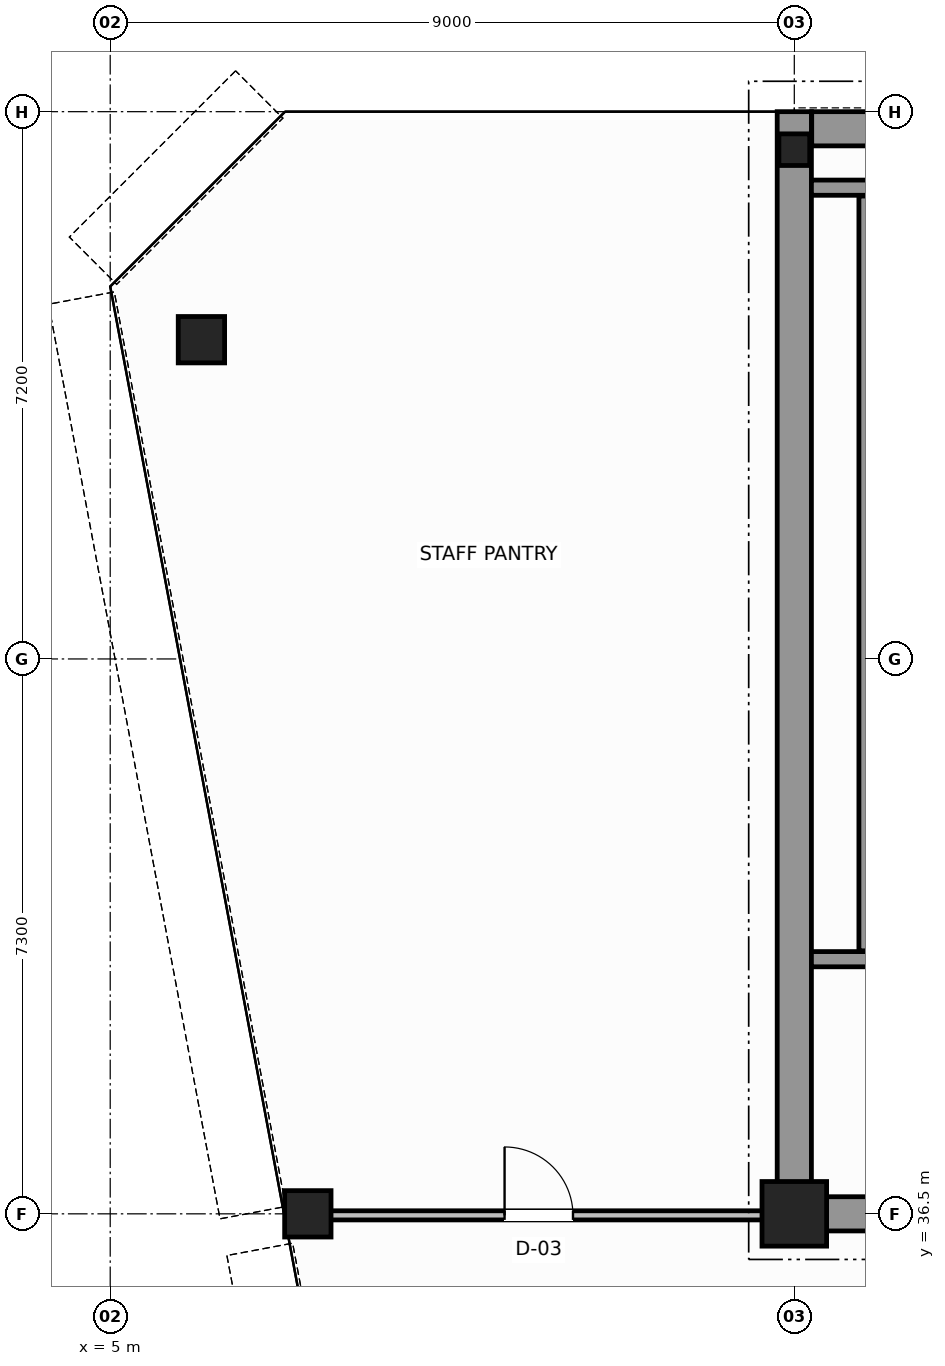
"""IFC4 building model, lengths in metres.
Left out: names, types, materials, properties, quantities, classifications, styles, units other than length and angle.
Written with IfcOpenShell. Run it as: python <this file> out.ifc"""

import sys

from ifc_helpers import new_model, si_unit, direction, frame, frame_2d, origin, origin_2d, place, context, subcontext, project, spatial, rectangle, hollow_circle, i_section, extrude, source, transform, mapped, element, fill, save


model = new_model("IFC4")
c1 = context("Model", 3, precision=1e-05, world=origin(), true_north=direction((0.0, 1.0)))
c2 = subcontext(c1, "Body", "Model", "MODEL_VIEW")
j1 = project(units=[si_unit("LENGTHUNIT", "METRE"), si_unit("PLANEANGLEUNIT", "RADIAN")], contexts=[c1])
p1 = place(None, origin())
s1 = spatial("IfcSite", under=j1, at=p1, CompositionType="ELEMENT")
p2 = place(p1, origin())
s2 = spatial("IfcBuilding", under=s1, at=p2, CompositionType="ELEMENT")
p3 = place(p2, frame((0.0, 0.0, 299.2)))
s3 = spatial("IfcBuildingStorey", under=s2, at=p3, CompositionType="ELEMENT", Elevation=299.2)
m1 = source(origin(), c2, "Body", "SweptSolid", [
    extrude(rectangle(XDim=0.85, YDim=0.85, at=origin_2d()), origin(), (0.0, 0.0, 1.0), 4.6),
])
p4 = place(p3, frame((14.0, 36.5, 0.0), z_axis=(0.0, 0.0, 1.0), x_axis=(1.0, 0.0, 0.0)))
e1 = element("IfcColumn", 1, at=p4, inside=s3, PredefinedType="COLUMN", context=c2, shape_type="MappedRepresentation", body=[
    mapped(m1, transform((0.0, 0.0, 0.0), scale=1.0)),
])
m2 = source(origin(), c2, "Body", "SweptSolid", [
    extrude(i_section(OverallWidth=0.406, OverallDepth=0.416, WebThickness=0.03, FlangeThickness=0.042, FilletRadius=0.015, at=origin_2d()), origin(), (0.0, 0.0, 1.0), 4.6),
])
p5 = place(p3, frame((14.0, 50.5, 0.0), z_axis=(0.0, 0.0, 1.0), x_axis=(1.0, 0.0, 0.0)))
e2 = element("IfcColumn", 2, at=p5, inside=s3, PredefinedType="COLUMN", context=c2, shape_type="MappedRepresentation", body=[
    mapped(m2, transform((0.0, 0.0, 0.0), scale=1.0)),
])
m3 = source(origin(), c2, "Body", "SweptSolid", [
    extrude(hollow_circle(Radius=0.305, WallThickness=0.03, at=origin_2d()), origin(), (0.0, 0.0, 1.0), 4.6),
])
for number, where, z_axis, x_axis in (
    (3, (6.2, 48.0, 0.0), (0.0, 0.0, 1.0), (1.0, 0.0, 0.0)),
    (4, (7.6, 36.5, 0.0), (0.0, 0.0, 1.0), (1.0, 0.0, 0.0)),
):
    element("IfcColumn", number, at=place(p3, frame(where, z_axis=z_axis, x_axis=x_axis)), inside=s3, PredefinedType="COLUMN", context=c2, shape_type="MappedRepresentation", body=[
        mapped(m3, transform((0.0, 0.0, 0.0), scale=1.0)),
    ])
p6 = place(p3, frame((14.229, 50.775, 0.0), z_axis=(0.0, 0.0, 1.0), x_axis=(1.0, 0.0, 0.0)))
e5 = element("IfcWall", 5, at=p6, inside=s3, PredefinedType="SHEAR", context=c2, shape_type="SweptSolid", body=[
    extrude(rectangle(XDim=19.769, YDim=0.45, at=frame_2d((9.885, 0.0))), origin(), (0.0, 0.0, 1.0), 4.6),
])
p7 = place(p3, frame((14.0, 36.5, 0.0), z_axis=(0.0, 0.0, 1.0), x_axis=(0.0, 1.0, 0.0)))
e6 = element("IfcWall", 6, at=p7, inside=s3, PredefinedType="SHEAR", context=c2, shape_type="SweptSolid", body=[
    extrude(rectangle(XDim=14.5, YDim=0.45, at=frame_2d((7.25, 0.0))), origin(), (0.0, 0.0, 1.0), 4.6),
])
p8 = place(p3, frame((14.245, 36.5, 0.0), z_axis=(0.0, 0.0, 1.0), x_axis=(1.0, 0.0, 0.0)))
e7 = element("IfcWall", 7, at=p8, inside=s3, PredefinedType="SHEAR", context=c2, shape_type="SweptSolid", body=[
    extrude(rectangle(XDim=3.955, YDim=0.45, at=frame_2d((1.978, 0.0))), origin(), (0.0, 0.0, 1.0), 3.3),
])
p9 = place(p3, frame((14.225, 39.85, 0.0), z_axis=(0.0, 0.0, 1.0), x_axis=(1.0, 0.0, 0.0)))
e8 = element("IfcWall", 8, at=p9, inside=s3, PredefinedType="SOLIDWALL", context=c2, shape_type="SweptSolid", body=[
    extrude(rectangle(XDim=4.375, YDim=0.2, at=frame_2d((2.188, 0.0))), origin(), (0.0, 0.0, 1.0), 4.6),
])
p10 = place(p9, frame((1.95, 0.0, 0.0)))
e9 = element("IfcOpeningElement", 9, at=p10, cuts=e8, PredefinedType="OPENING", context=c2, shape_type="SweptSolid", body=[
    extrude(rectangle(XDim=1.1, YDim=2.15, at=frame_2d((0.55, 1.075))), frame((0.0, 0.11, 0.0), z_axis=(0.0, -1.0, 0.0), x_axis=(1.0, 0.0, 0.0)), (0.0, 0.0, 1.0), 0.22),
])
p11 = place(p3, frame((14.225, 50.0, 0.0), z_axis=(0.0, 0.0, 1.0), x_axis=(1.0, 0.0, 0.0)))
e10 = element("IfcWall", 10, at=p11, inside=s3, PredefinedType="SOLIDWALL", context=c2, shape_type="SweptSolid", body=[
    extrude(rectangle(XDim=4.375, YDim=0.2, at=frame_2d((2.188, 0.0))), origin(), (0.0, 0.0, 1.0), 4.6),
])
p12 = place(p3, frame((14.95, 39.96, 0.0), z_axis=(0.0, 0.0, 1.0), x_axis=(0.0, 1.0, 0.0)))
e11 = element("IfcWall", 11, at=p12, inside=s3, PredefinedType="SOLIDWALL", context=c2, shape_type="SweptSolid", body=[
    extrude(rectangle(XDim=9.93, YDim=0.2, at=frame_2d((4.965, 0.0))), origin(), (0.0, 0.0, 1.0), 4.6),
])
p13 = place(p3, frame((7.336, 36.48, 0.0), z_axis=(0.0, 0.0, 1.0), x_axis=(1.0, 0.0, 0.0)))
e12 = element("IfcWall", 12, at=p13, inside=s3, PredefinedType="PARTITIONING", context=c2, shape_type="SweptSolid", body=[
    extrude(rectangle(XDim=6.604, YDim=0.12, at=frame_2d((3.302, 0.0))), origin(), (0.0, 0.0, 1.0), 3.09),
])
p14 = place(p13, frame((2.852, 0.0, 0.0)))
e13 = element("IfcOpeningElement", 13, at=p14, cuts=e12, PredefinedType="OPENING", context=c2, shape_type="SweptSolid", body=[
    extrude(rectangle(XDim=0.9, YDim=2.15, at=frame_2d((0.45, 1.075))), frame((0.0, 0.07, 0.0), z_axis=(0.0, -1.0, 0.0), x_axis=(1.0, 0.0, 0.0)), (0.0, 0.0, 1.0), 0.14),
])
m4 = source(origin(), c2, "Body", "SweptSolid", [
    extrude(rectangle(XDim=0.9, YDim=2.15, at=frame_2d((0.45, 1.075))), frame((0.0, 0.025, 0.0), z_axis=(0.0, -1.0, 0.0), x_axis=(1.0, 0.0, 0.0)), (0.0, 0.0, 1.0), 0.05),
])
p15 = place(p14, origin())
e14 = element("IfcDoor", 14, at=p15, inside=s3, OperationType="SINGLE_SWING_LEFT", PredefinedType="DOOR", context=c2, shape_type="MappedRepresentation", body=[
    mapped(m4, transform((0.0, 0.0, 0.0), scale=1.0)),
])
fill(e13, e14)
save(model, sys.argv[1])
